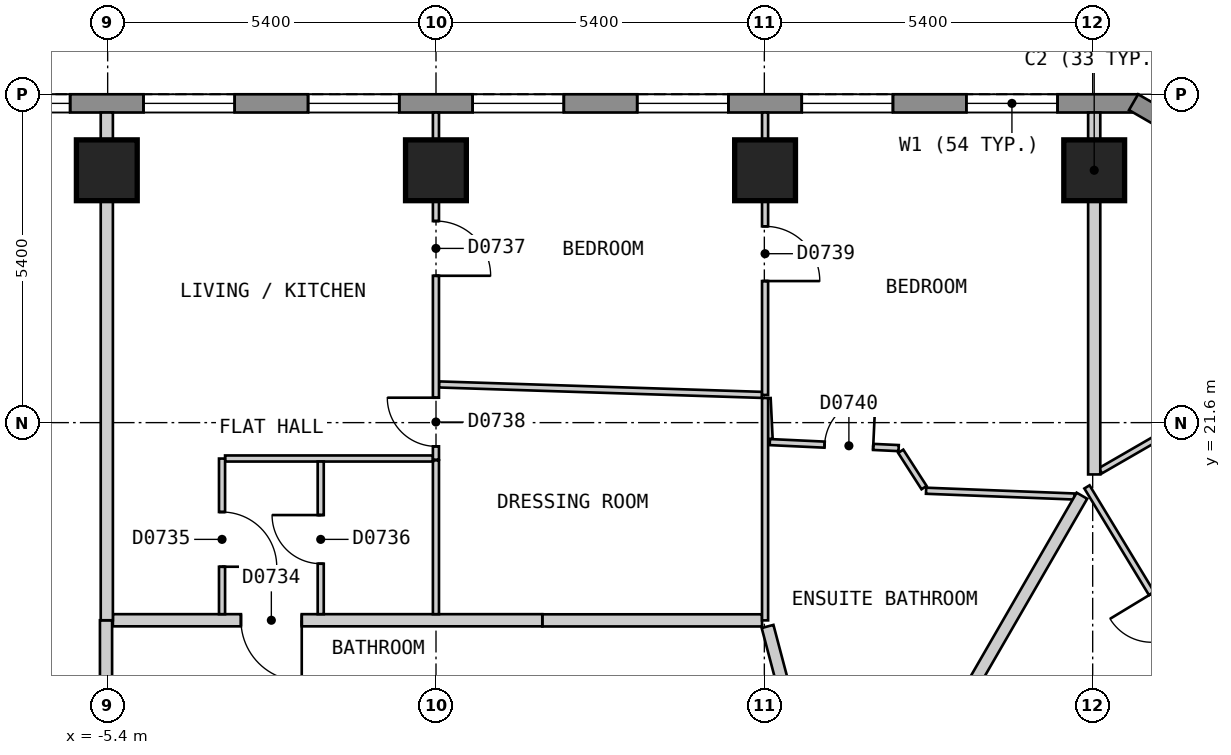
"""IFC4 building model, lengths in metres.
Left out: names, types, materials, properties, quantities, classifications, styles, units other than length and angle.
Written with IfcOpenShell. Run it as: python <this file> out.ifc"""

import sys

from ifc_helpers import new_model, si_unit, direction, frame, frame_2d, origin, origin_2d, place, context, subcontext, project, spatial, polyline, rectangle, outline, extrude, element, fill, save


model = new_model("IFC4")
c1 = context("Model", 3, precision=1e-05, world=origin(), true_north=direction((0.0, 1.0)))
c2 = subcontext(c1, "Body", "Model", "MODEL_VIEW")
j1 = project(units=[si_unit("LENGTHUNIT", "METRE"), si_unit("PLANEANGLEUNIT", "RADIAN")], contexts=[c1])
p1 = place(None, origin())
s1 = spatial("IfcSite", under=j1, at=p1, CompositionType="ELEMENT")
p2 = place(p1, origin())
s2 = spatial("IfcBuilding", under=s1, at=p2, CompositionType="ELEMENT")
p3 = place(p2, frame((0.0, 0.0, 105.0)))
s3 = spatial("IfcBuildingStorey", under=s2, at=p3, CompositionType="ELEMENT", Elevation=105.0)
for number, where, z_axis, x_axis in (
    (1, (10.825, 25.75, 0.0), (0.0, 0.0, 1.0), (-1.0, 0.0, 0.0)),
    (2, (5.412, 25.75, 0.0), (0.0, 0.0, 1.0), (-1.0, 0.0, 0.0)),
    (3, (-0.001, 25.75, 0.0), (0.0, 0.0, 1.0), (-1.0, 0.0, 0.0)),
    (4, (-5.414, 25.75, 0.0), (0.0, 0.0, 1.0), (-1.0, 0.0, 0.0)),
):
    element("IfcColumn", number, at=place(p3, frame(where, z_axis=z_axis, x_axis=x_axis)), inside=s3, PredefinedType="COLUMN", context=c2, shape_type="SweptSolid", body=[
        extrude(rectangle(XDim=1.0, YDim=1.0, at=origin_2d()), origin(), (0.0, 0.0, 1.0), 3.0),
    ])
p4 = place(p3, frame((11.547, 26.85, 0.0), z_axis=(0.0, 0.0, 1.0), x_axis=(-1.0, 0.0, 0.0)))
e5 = element("IfcWall", 5, at=p4, inside=s3, PredefinedType="SOLIDWALL", context=c2, shape_type="SweptSolid", body=[
    extrude(outline(polyline([(0.0, -0.15), (23.094, -0.15), (23.014, 0.15), (0.08, 0.15), (0.0, -0.15)])), origin(), (0.0, 0.0, 1.0), 2.6),
])
p5 = place(p4, frame((1.325, 0.0, 0.15)))
e6 = element("IfcOpeningElement", 6, at=p5, cuts=e5, PredefinedType="OPENING", context=c2, shape_type="SweptSolid", body=[
    extrude(rectangle(XDim=1.5, YDim=2.1, at=frame_2d((0.75, 1.05))), frame((0.0, 0.16, 0.0), z_axis=(0.0, -1.0, 0.0), x_axis=(1.0, 0.0, 0.0)), (0.0, 0.0, 1.0), 0.32),
])
p6 = place(p4, frame((4.032, 0.0, 0.15)))
e7 = element("IfcOpeningElement", 7, at=p6, cuts=e5, PredefinedType="OPENING", context=c2, shape_type="SweptSolid", body=[
    extrude(rectangle(XDim=1.5, YDim=2.1, at=frame_2d((0.75, 1.05))), frame((0.0, 0.16, 0.0), z_axis=(0.0, -1.0, 0.0), x_axis=(1.0, 0.0, 0.0)), (0.0, 0.0, 1.0), 0.32),
])
p7 = place(p4, frame((6.738, 0.0, 0.15)))
e8 = element("IfcOpeningElement", 8, at=p7, cuts=e5, PredefinedType="OPENING", context=c2, shape_type="SweptSolid", body=[
    extrude(rectangle(XDim=1.5, YDim=2.1, at=frame_2d((0.75, 1.05))), frame((0.0, 0.16, 0.0), z_axis=(0.0, -1.0, 0.0), x_axis=(1.0, 0.0, 0.0)), (0.0, 0.0, 1.0), 0.32),
])
p8 = place(p4, frame((9.445, 0.0, 0.15)))
e9 = element("IfcOpeningElement", 9, at=p8, cuts=e5, PredefinedType="OPENING", context=c2, shape_type="SweptSolid", body=[
    extrude(rectangle(XDim=1.5, YDim=2.1, at=frame_2d((0.75, 1.05))), frame((0.0, 0.16, 0.0), z_axis=(0.0, -1.0, 0.0), x_axis=(1.0, 0.0, 0.0)), (0.0, 0.0, 1.0), 0.32),
])
p9 = place(p4, frame((12.151, 0.0, 0.15)))
e10 = element("IfcOpeningElement", 10, at=p9, cuts=e5, PredefinedType="OPENING", context=c2, shape_type="SweptSolid", body=[
    extrude(rectangle(XDim=1.5, YDim=2.1, at=frame_2d((0.75, 1.05))), frame((0.0, 0.16, 0.0), z_axis=(0.0, -1.0, 0.0), x_axis=(1.0, 0.0, 0.0)), (0.0, 0.0, 1.0), 0.32),
])
p10 = place(p4, frame((14.858, 0.0, 0.15)))
e11 = element("IfcOpeningElement", 11, at=p10, cuts=e5, PredefinedType="OPENING", context=c2, shape_type="SweptSolid", body=[
    extrude(rectangle(XDim=1.5, YDim=2.1, at=frame_2d((0.75, 1.05))), frame((0.0, 0.16, 0.0), z_axis=(0.0, -1.0, 0.0), x_axis=(1.0, 0.0, 0.0)), (0.0, 0.0, 1.0), 0.32),
])
p11 = place(p4, frame((17.564, 0.0, 0.15)))
e12 = element("IfcOpeningElement", 12, at=p11, cuts=e5, PredefinedType="OPENING", context=c2, shape_type="SweptSolid", body=[
    extrude(rectangle(XDim=1.5, YDim=2.1, at=frame_2d((0.75, 1.05))), frame((0.0, 0.16, 0.0), z_axis=(0.0, -1.0, 0.0), x_axis=(1.0, 0.0, 0.0)), (0.0, 0.0, 1.0), 0.32),
])
p12 = place(p4, frame((20.271, 0.0, 0.15)))
e13 = element("IfcOpeningElement", 13, at=p12, cuts=e5, PredefinedType="OPENING", context=c2, shape_type="SweptSolid", body=[
    extrude(rectangle(XDim=1.5, YDim=2.1, at=frame_2d((0.75, 1.05))), frame((0.0, 0.16, 0.0), z_axis=(0.0, -1.0, 0.0), x_axis=(1.0, 0.0, 0.0)), (0.0, 0.0, 1.0), 0.32),
])
p13 = place(p3, frame((15.802, 24.37, 0.0), z_axis=(0.0, 0.0, 1.0), x_axis=(-0.866022959057, 0.500004234368, 0.0)))
e14 = element("IfcWall", 14, at=p13, inside=s3, PredefinedType="SOLIDWALL", context=c2, shape_type="SweptSolid", body=[
    extrude(outline(polyline([(0.0, -0.15), (5.0, -0.15), (4.92, 0.15), (0.08, 0.15), (0.0, -0.15)])), origin(), (0.0, 0.0, 1.0), 2.6),
])
p14 = place(p13, frame((0.65, 0.0, 0.15)))
e15 = element("IfcOpeningElement", 15, at=p14, cuts=e14, PredefinedType="OPENING", context=c2, shape_type="SweptSolid", body=[
    extrude(rectangle(XDim=1.2, YDim=2.1, at=frame_2d((0.6, 1.05))), frame((0.0, 0.16, 0.0), z_axis=(0.0, -1.0, 0.0), x_axis=(1.0, 0.0, 0.0)), (0.0, 0.0, 1.0), 0.32),
])
p15 = place(p13, frame((3.15, 0.0, 0.15)))
e16 = element("IfcOpeningElement", 16, at=p15, cuts=e14, PredefinedType="OPENING", context=c2, shape_type="SweptSolid", body=[
    extrude(rectangle(XDim=1.2, YDim=2.1, at=frame_2d((0.6, 1.05))), frame((0.0, 0.16, 0.0), z_axis=(0.0, -1.0, 0.0), x_axis=(1.0, 0.0, 0.0)), (0.0, 0.0, 1.0), 0.32),
])
p16 = place(p3, frame((5.453, 18.248, 0.0), z_axis=(0.0, 0.0, 1.0), x_axis=(0.255687088482, -0.9667595941, 0.0)))
e17 = element("IfcWall", 17, at=p16, inside=s3, PredefinedType="PARTITIONING", context=c2, shape_type="SweptSolid", body=[
    extrude(rectangle(XDim=1.6, YDim=0.2, at=frame_2d((0.8, 0.0))), origin(), (0.0, 0.0, 1.0), 2.6),
])
p17 = place(p3, frame((1.75, 18.348, 0.0), z_axis=(0.0, 0.0, 1.0), x_axis=(1.0, 0.0, 0.0)))
e18 = element("IfcWall", 18, at=p17, inside=s3, PredefinedType="PARTITIONING", context=c2, shape_type="SweptSolid", body=[
    extrude(rectangle(XDim=3.612, YDim=0.2, at=frame_2d((1.806, 0.0))), origin(), (0.0, 0.0, 1.0), 2.6),
])
p18 = place(p3, frame((-5.314, 18.35, 0.0), z_axis=(0.0, 0.0, 1.0), x_axis=(1.0, 0.0, 0.0)))
e19 = element("IfcWall", 19, at=p18, inside=s3, PredefinedType="PARTITIONING", context=c2, shape_type="SweptSolid", body=[
    extrude(rectangle(XDim=7.062, YDim=0.2, at=frame_2d((3.531, 0.0))), origin(), (0.0, 0.0, 1.0), 2.6),
])
p19 = place(p18, frame((2.106, 0.0, 0.0)))
e20 = element("IfcOpeningElement", 20, at=p19, cuts=e19, PredefinedType="OPENING", context=c2, shape_type="SweptSolid", body=[
    extrude(rectangle(XDim=1.0, YDim=2.1, at=frame_2d((0.5, 1.05))), frame((0.0, 0.11, 0.0), z_axis=(0.0, -1.0, 0.0), x_axis=(1.0, 0.0, 0.0)), (0.0, 0.0, 1.0), 0.22),
])
p20 = place(p3, frame((-5.427, 17.4, 0.0), z_axis=(0.0, 0.0, 1.0), x_axis=(0.0, 1.0, 0.0)))
e21 = element("IfcWall", 21, at=p20, inside=s3, PredefinedType="PARTITIONING", context=c2, shape_type="SweptSolid", body=[
    extrude(rectangle(XDim=0.95, YDim=0.2, at=frame_2d((0.475, 0.0))), origin(), (0.0, 0.0, 1.0), 2.6),
])
p21 = place(p3, frame((7.643, 21.129, 0.0), z_axis=(0.0, 0.0, 1.0), x_axis=(0.540427628168, -0.841390503104, 0.0)))
e22 = element("IfcWall", 22, at=p21, inside=s3, PredefinedType="PARTITIONING", context=c2, shape_type="SweptSolid", body=[
    extrude(rectangle(XDim=0.711, YDim=0.1, at=frame_2d((0.355, 0.0))), origin(), (0.0, 0.0, 1.0), 2.6),
])
p22 = place(p3, frame((10.706, 20.543, 0.0), z_axis=(0.0, 0.0, 1.0), x_axis=(0.518240414093, -0.855234981278, 0.0)))
e23 = element("IfcWall", 23, at=p22, inside=s3, PredefinedType="PARTITIONING", context=c2, shape_type="SweptSolid", body=[
    extrude(rectangle(XDim=4.855, YDim=0.1, at=frame_2d((2.427, 0.0))), origin(), (0.0, 0.0, 1.0), 2.6),
])
p23 = place(p22, frame((2.052, 0.0, 0.0)))
e24 = element("IfcOpeningElement", 24, at=p23, cuts=e23, PredefinedType="OPENING", context=c2, shape_type="SweptSolid", body=[
    extrude(rectangle(XDim=0.8, YDim=2.1, at=frame_2d((0.4, 1.05))), frame((0.0, 0.06, 0.0), z_axis=(0.0, -1.0, 0.0), x_axis=(1.0, 0.0, 0.0)), (0.0, 0.0, 1.0), 0.12),
])
p24 = place(p3, frame((5.454, 22.002, 0.0), z_axis=(0.0, 0.0, 1.0), x_axis=(0.048996315227, -0.998798959298, 0.0)))
e25 = element("IfcWall", 25, at=p24, inside=s3, PredefinedType="PARTITIONING", context=c2, shape_type="SweptSolid", body=[
    extrude(rectangle(XDim=0.673, YDim=0.1, at=frame_2d((0.336, 0.0))), origin(), (0.0, 0.0, 1.0), 2.6),
])
p25 = place(p3, frame((-0.001, 20.98, 0.0), z_axis=(0.0, 0.0, 1.0), x_axis=(0.0, -1.0, 0.0)))
e26 = element("IfcWall", 26, at=p25, inside=s3, PredefinedType="PARTITIONING", context=c2, shape_type="SweptSolid", body=[
    extrude(rectangle(XDim=2.53, YDim=0.1, at=frame_2d((1.265, 0.0))), origin(), (0.0, 0.0, 1.0), 2.6),
])
p26 = place(p3, frame((5.412, 22.005, 0.0), z_axis=(0.0, 0.0, 1.0), x_axis=(0.0, -1.0, 0.0)))
e27 = element("IfcWall", 27, at=p26, inside=s3, PredefinedType="PARTITIONING", context=c2, shape_type="SweptSolid", body=[
    extrude(rectangle(XDim=3.657, YDim=0.1, at=frame_2d((1.829, 0.0))), origin(), (0.0, 0.0, 1.0), 2.6),
])
p27 = place(p3, frame((8.06, 20.48, 0.0), z_axis=(0.0, 0.0, 1.0), x_axis=(0.999243345912, -0.038893902497, 0.0)))
e28 = element("IfcWall", 28, at=p27, inside=s3, PredefinedType="PARTITIONING", context=c2, shape_type="SweptSolid", body=[
    extrude(rectangle(XDim=2.442, YDim=0.1, at=frame_2d((1.221, 0.0))), origin(), (0.0, 0.0, 1.0), 2.6),
])
p28 = place(p3, frame((0.049, 22.228, 0.0), z_axis=(0.0, 0.0, 1.0), x_axis=(0.99947566488, -0.032378933174, 0.0)))
e29 = element("IfcWall", 29, at=p28, inside=s3, PredefinedType="PARTITIONING", context=c2, shape_type="SweptSolid", body=[
    extrude(rectangle(XDim=5.316, YDim=0.1, at=frame_2d((2.658, 0.0))), origin(), (0.0, 0.0, 1.0), 2.6),
])
p29 = place(p3, frame((5.49, 21.28, 0.0), z_axis=(0.0, 0.0, 1.0), x_axis=(0.998907627838, -0.046728482187, 0.0)))
e30 = element("IfcWall", 30, at=p29, inside=s3, PredefinedType="PARTITIONING", context=c2, shape_type="SweptSolid", body=[
    extrude(rectangle(XDim=2.121, YDim=0.1, at=frame_2d((1.061, 0.0))), origin(), (0.0, 0.0, 1.0), 2.6),
])
p30 = place(p29, frame((0.902, 0.0, 0.0)))
e31 = element("IfcOpeningElement", 31, at=p30, cuts=e30, PredefinedType="OPENING", context=c2, shape_type="SweptSolid", body=[
    extrude(rectangle(XDim=0.8, YDim=2.1, at=frame_2d((0.4, 1.05))), frame((0.0, 0.06, 0.0), z_axis=(0.0, -1.0, 0.0), x_axis=(1.0, 0.0, 0.0)), (0.0, 0.0, 1.0), 0.12),
])
p31 = place(p3, frame((-3.469, 21.01, 0.0), z_axis=(0.0, 0.0, 1.0), x_axis=(1.0, 0.0, 0.0)))
e32 = element("IfcWall", 32, at=p31, inside=s3, PredefinedType="PARTITIONING", context=c2, shape_type="SweptSolid", body=[
    extrude(rectangle(XDim=3.418, YDim=0.1, at=frame_2d((1.709, 0.0))), origin(), (0.0, 0.0, 1.0), 2.6),
])
p32 = place(p3, frame((5.412, 22.055, 0.0), z_axis=(0.0, 0.0, 1.0), x_axis=(0.0, 1.0, 0.0)))
e33 = element("IfcWall", 33, at=p32, inside=s3, PredefinedType="PARTITIONING", context=c2, shape_type="SweptSolid", body=[
    extrude(rectangle(XDim=4.645, YDim=0.1, at=frame_2d((2.323, 0.0))), origin(), (0.0, 0.0, 1.0), 2.6),
])
p33 = place(p32, frame((1.873, 0.0, 0.0)))
e34 = element("IfcOpeningElement", 34, at=p33, cuts=e33, PredefinedType="OPENING", context=c2, shape_type="SweptSolid", body=[
    extrude(rectangle(XDim=0.9, YDim=2.1, at=frame_2d((0.45, 1.05))), frame((0.0, 0.06, 0.0), z_axis=(0.0, -1.0, 0.0), x_axis=(1.0, 0.0, 0.0)), (0.0, 0.0, 1.0), 0.12),
])
p34 = place(p3, frame((-0.001, 20.99, 0.0), z_axis=(0.0, 0.0, 1.0), x_axis=(0.0, 1.0, 0.0)))
e35 = element("IfcWall", 35, at=p34, inside=s3, PredefinedType="PARTITIONING", context=c2, shape_type="SweptSolid", body=[
    extrude(rectangle(XDim=5.71, YDim=0.1, at=frame_2d((2.855, 0.0))), origin(), (0.0, 0.0, 1.0), 2.6),
])
p35 = place(p34, frame((3.025, 0.0, 0.0)))
e36 = element("IfcOpeningElement", 36, at=p35, cuts=e35, PredefinedType="OPENING", context=c2, shape_type="SweptSolid", body=[
    extrude(rectangle(XDim=0.9, YDim=2.1, at=frame_2d((0.45, 1.05))), frame((0.0, 0.06, 0.0), z_axis=(0.0, -1.0, 0.0), x_axis=(1.0, 0.0, 0.0)), (0.0, 0.0, 1.0), 0.12),
])
p36 = place(p34, frame((0.22, 0.0, 0.0)))
e37 = element("IfcOpeningElement", 37, at=p36, cuts=e35, PredefinedType="OPENING", context=c2, shape_type="SweptSolid", body=[
    extrude(rectangle(XDim=0.8, YDim=2.1, at=frame_2d((0.4, 1.05))), frame((0.0, 0.06, 0.0), z_axis=(0.0, -1.0, 0.0), x_axis=(1.0, 0.0, 0.0)), (0.0, 0.0, 1.0), 0.12),
])
p37 = place(p3, frame((-3.519, 18.45, 0.0), z_axis=(0.0, 0.0, 1.0), x_axis=(0.0, 1.0, 0.0)))
e38 = element("IfcWall", 38, at=p37, inside=s3, PredefinedType="PARTITIONING", context=c2, shape_type="SweptSolid", body=[
    extrude(rectangle(XDim=2.559, YDim=0.1, at=frame_2d((1.28, 0.0))), origin(), (0.0, 0.0, 1.0), 2.6),
])
p38 = place(p37, frame((0.78, 0.0, 0.0)))
e39 = element("IfcOpeningElement", 39, at=p38, cuts=e38, PredefinedType="OPENING", context=c2, shape_type="SweptSolid", body=[
    extrude(rectangle(XDim=0.9, YDim=2.1, at=frame_2d((0.45, 1.05))), frame((0.0, 0.06, 0.0), z_axis=(0.0, -1.0, 0.0), x_axis=(1.0, 0.0, 0.0)), (0.0, 0.0, 1.0), 0.12),
])
p39 = place(p3, frame((-1.896, 18.45, 0.0), z_axis=(0.0, 0.0, 1.0), x_axis=(0.0, 1.0, 0.0)))
e40 = element("IfcWall", 40, at=p39, inside=s3, PredefinedType="PARTITIONING", context=c2, shape_type="SweptSolid", body=[
    extrude(rectangle(XDim=2.51, YDim=0.1, at=frame_2d((1.255, 0.0))), origin(), (0.0, 0.0, 1.0), 2.6),
])
p40 = place(p39, frame((0.83, 0.0, 0.0)))
e41 = element("IfcOpeningElement", 41, at=p40, cuts=e40, PredefinedType="OPENING", context=c2, shape_type="SweptSolid", body=[
    extrude(rectangle(XDim=0.8, YDim=2.1, at=frame_2d((0.4, 1.05))), frame((0.0, 0.06, 0.0), z_axis=(0.0, -1.0, 0.0), x_axis=(1.0, 0.0, 0.0)), (0.0, 0.0, 1.0), 0.12),
])
p41 = place(p3, frame((9.83, 14.375, 0.0), z_axis=(0.0, 0.0, 1.0), x_axis=(0.866016855193, 0.500014806302, 0.0)))
e42 = element("IfcWall", 42, at=p41, inside=s3, PredefinedType="PARTITIONING", context=c2, shape_type="SweptSolid", body=[
    extrude(rectangle(XDim=10.0, YDim=0.1, at=frame_2d((5.0, 0.0))), origin(), (0.0, 0.0, 1.0), 2.6),
])
p42 = place(p41, frame((6.523, 0.0, 0.0)))
e43 = element("IfcOpeningElement", 43, at=p42, cuts=e42, PredefinedType="OPENING", context=c2, shape_type="SweptSolid", body=[
    extrude(rectangle(XDim=0.9, YDim=2.1, at=frame_2d((0.45, 1.05))), frame((0.0, 0.06, 0.0), z_axis=(0.0, -1.0, 0.0), x_axis=(1.0, 0.0, 0.0)), (0.0, 0.0, 1.0), 0.12),
])
p43 = place(p3, frame((10.926, 20.808, 0.0), z_axis=(0.0, 0.0, 1.0), x_axis=(0.86600925905, 0.500027962457, 0.0)))
e44 = element("IfcWall", 44, at=p43, inside=s3, PredefinedType="PARTITIONING", context=c2, shape_type="SweptSolid", body=[
    extrude(rectangle(XDim=5.834, YDim=0.1, at=frame_2d((2.917, 0.0))), origin(), (0.0, 0.0, 1.0), 2.6),
])
p44 = place(p43, frame((2.409, 0.0, 0.0)))
e45 = element("IfcOpeningElement", 45, at=p44, cuts=e44, PredefinedType="OPENING", context=c2, shape_type="SweptSolid", body=[
    extrude(rectangle(XDim=0.9, YDim=2.1, at=frame_2d((0.45, 1.05))), frame((0.0, 0.06, 0.0), z_axis=(0.0, -1.0, 0.0), x_axis=(1.0, 0.0, 0.0)), (0.0, 0.0, 1.0), 0.12),
])
p45 = place(p3, frame((-5.414, 26.7, 0.0), z_axis=(0.0, 0.0, 1.0), x_axis=(0.0, -1.0, 0.0)))
e46 = element("IfcWall", 46, at=p45, inside=s3, PredefinedType="PARTITIONING", context=c2, shape_type="SweptSolid", body=[
    extrude(rectangle(XDim=8.35, YDim=0.2, at=frame_2d((4.175, 0.0))), origin(), (0.0, 0.0, 1.0), 2.6),
])
p46 = place(p3, frame((8.43, 16.6, 0.0), z_axis=(0.0, 0.0, 1.0), x_axis=(0.500072613115, 0.865983476524, 0.0)))
e47 = element("IfcWall", 47, at=p46, inside=s3, PredefinedType="PARTITIONING", context=c2, shape_type="SweptSolid", body=[
    extrude(rectangle(XDim=4.385, YDim=0.2, at=frame_2d((2.193, 0.0))), origin(), (0.0, 0.0, 1.0), 2.6),
])
p47 = place(p3, frame((10.825, 20.748, 0.0), z_axis=(0.0, 0.0, 1.0), x_axis=(0.0, 1.0, 0.0)))
e48 = element("IfcWall", 48, at=p47, inside=s3, PredefinedType="PARTITIONING", context=c2, shape_type="SweptSolid", body=[
    extrude(rectangle(XDim=5.952, YDim=0.2, at=frame_2d((2.976, 0.0))), origin(), (0.0, 0.0, 1.0), 2.6),
])
p48 = place(p5, origin())
e49 = element("IfcWindow", 49, at=p48, inside=s3, PartitioningType="SINGLE_PANEL", PredefinedType="WINDOW", context=c2, shape_type="SweptSolid", body=[
    extrude(rectangle(XDim=1.5, YDim=2.1, at=frame_2d((0.75, 1.05))), frame((0.0, 0.03, 0.0), z_axis=(0.0, -1.0, 0.0), x_axis=(1.0, 0.0, 0.0)), (0.0, 0.0, 1.0), 0.06),
])
fill(e6, e49)
p49 = place(p6, origin())
e50 = element("IfcWindow", 50, at=p49, inside=s3, PartitioningType="SINGLE_PANEL", PredefinedType="WINDOW", context=c2, shape_type="SweptSolid", body=[
    extrude(rectangle(XDim=1.5, YDim=2.1, at=frame_2d((0.75, 1.05))), frame((0.0, 0.03, 0.0), z_axis=(0.0, -1.0, 0.0), x_axis=(1.0, 0.0, 0.0)), (0.0, 0.0, 1.0), 0.06),
])
fill(e7, e50)
p50 = place(p7, origin())
e51 = element("IfcWindow", 51, at=p50, inside=s3, PartitioningType="SINGLE_PANEL", PredefinedType="WINDOW", context=c2, shape_type="SweptSolid", body=[
    extrude(rectangle(XDim=1.5, YDim=2.1, at=frame_2d((0.75, 1.05))), frame((0.0, 0.03, 0.0), z_axis=(0.0, -1.0, 0.0), x_axis=(1.0, 0.0, 0.0)), (0.0, 0.0, 1.0), 0.06),
])
fill(e8, e51)
p51 = place(p8, origin())
e52 = element("IfcWindow", 52, at=p51, inside=s3, PartitioningType="SINGLE_PANEL", PredefinedType="WINDOW", context=c2, shape_type="SweptSolid", body=[
    extrude(rectangle(XDim=1.5, YDim=2.1, at=frame_2d((0.75, 1.05))), frame((0.0, 0.03, 0.0), z_axis=(0.0, -1.0, 0.0), x_axis=(1.0, 0.0, 0.0)), (0.0, 0.0, 1.0), 0.06),
])
fill(e9, e52)
p52 = place(p9, origin())
e53 = element("IfcWindow", 53, at=p52, inside=s3, PartitioningType="SINGLE_PANEL", PredefinedType="WINDOW", context=c2, shape_type="SweptSolid", body=[
    extrude(rectangle(XDim=1.5, YDim=2.1, at=frame_2d((0.75, 1.05))), frame((0.0, 0.03, 0.0), z_axis=(0.0, -1.0, 0.0), x_axis=(1.0, 0.0, 0.0)), (0.0, 0.0, 1.0), 0.06),
])
fill(e10, e53)
p53 = place(p10, origin())
e54 = element("IfcWindow", 54, at=p53, inside=s3, PartitioningType="SINGLE_PANEL", PredefinedType="WINDOW", context=c2, shape_type="SweptSolid", body=[
    extrude(rectangle(XDim=1.5, YDim=2.1, at=frame_2d((0.75, 1.05))), frame((0.0, 0.03, 0.0), z_axis=(0.0, -1.0, 0.0), x_axis=(1.0, 0.0, 0.0)), (0.0, 0.0, 1.0), 0.06),
])
fill(e11, e54)
p54 = place(p11, origin())
e55 = element("IfcWindow", 55, at=p54, inside=s3, PartitioningType="SINGLE_PANEL", PredefinedType="WINDOW", context=c2, shape_type="SweptSolid", body=[
    extrude(rectangle(XDim=1.5, YDim=2.1, at=frame_2d((0.75, 1.05))), frame((0.0, 0.03, 0.0), z_axis=(0.0, -1.0, 0.0), x_axis=(1.0, 0.0, 0.0)), (0.0, 0.0, 1.0), 0.06),
])
fill(e12, e55)
p55 = place(p23, origin())
e56 = element("IfcDoor", 56, at=p55, inside=s3, OperationType="SINGLE_SWING_LEFT", PredefinedType="DOOR", context=c2, shape_type="SweptSolid", body=[
    extrude(rectangle(XDim=0.8, YDim=2.1, at=frame_2d((0.4, 1.05))), frame((0.0, 0.025, 0.0), z_axis=(0.0, -1.0, 0.0), x_axis=(1.0, 0.0, 0.0)), (0.0, 0.0, 1.0), 0.05),
])
fill(e24, e56)
p56 = place(p19, origin())
e57 = element("IfcDoor", 57, at=p56, inside=s3, OperationType="SINGLE_SWING_RIGHT", PredefinedType="DOOR", context=c2, shape_type="SweptSolid", body=[
    extrude(rectangle(XDim=1.0, YDim=2.1, at=frame_2d((0.5, 1.05))), frame((0.0, 0.025, 0.0), z_axis=(0.0, -1.0, 0.0), x_axis=(1.0, 0.0, 0.0)), (0.0, 0.0, 1.0), 0.05),
])
fill(e20, e57)
p57 = place(p38, origin())
e58 = element("IfcDoor", 58, at=p57, inside=s3, OperationType="SINGLE_SWING_LEFT", PredefinedType="DOOR", context=c2, shape_type="SweptSolid", body=[
    extrude(rectangle(XDim=0.9, YDim=2.1, at=frame_2d((0.45, 1.05))), frame((0.0, 0.025, 0.0), z_axis=(0.0, -1.0, 0.0), x_axis=(1.0, 0.0, 0.0)), (0.0, 0.0, 1.0), 0.05),
])
fill(e39, e58)
p58 = place(p40, origin())
e59 = element("IfcDoor", 59, at=p58, inside=s3, OperationType="SINGLE_SWING_RIGHT", PredefinedType="DOOR", context=c2, shape_type="SweptSolid", body=[
    extrude(rectangle(XDim=0.8, YDim=2.1, at=frame_2d((0.4, 1.05))), frame((0.0, 0.025, 0.0), z_axis=(0.0, -1.0, 0.0), x_axis=(1.0, 0.0, 0.0)), (0.0, 0.0, 1.0), 0.05),
])
fill(e41, e59)
p59 = place(p35, origin())
e60 = element("IfcDoor", 60, at=p59, inside=s3, OperationType="SINGLE_SWING_LEFT", PredefinedType="DOOR", context=c2, shape_type="SweptSolid", body=[
    extrude(rectangle(XDim=0.9, YDim=2.1, at=frame_2d((0.45, 1.05))), frame((0.0, 0.025, 0.0), z_axis=(0.0, -1.0, 0.0), x_axis=(1.0, 0.0, 0.0)), (0.0, 0.0, 1.0), 0.05),
])
fill(e36, e60)
p60 = place(p36, origin())
e61 = element("IfcDoor", 61, at=p60, inside=s3, OperationType="SINGLE_SWING_RIGHT", PredefinedType="DOOR", context=c2, shape_type="SweptSolid", body=[
    extrude(rectangle(XDim=0.8, YDim=2.1, at=frame_2d((0.4, 1.05))), frame((0.0, 0.025, 0.0), z_axis=(0.0, -1.0, 0.0), x_axis=(1.0, 0.0, 0.0)), (0.0, 0.0, 1.0), 0.05),
])
fill(e37, e61)
p61 = place(p33, origin())
e62 = element("IfcDoor", 62, at=p61, inside=s3, OperationType="SINGLE_SWING_LEFT", PredefinedType="DOOR", context=c2, shape_type="SweptSolid", body=[
    extrude(rectangle(XDim=0.9, YDim=2.1, at=frame_2d((0.45, 1.05))), frame((0.0, 0.025, 0.0), z_axis=(0.0, -1.0, 0.0), x_axis=(1.0, 0.0, 0.0)), (0.0, 0.0, 1.0), 0.05),
])
fill(e34, e62)
p62 = place(p30, origin())
e63 = element("IfcDoor", 63, at=p62, inside=s3, OperationType="SINGLE_SWING_RIGHT", PredefinedType="DOOR", context=c2, shape_type="SweptSolid", body=[
    extrude(rectangle(XDim=0.8, YDim=2.1, at=frame_2d((0.4, 1.05))), frame((0.0, 0.025, 0.0), z_axis=(0.0, -1.0, 0.0), x_axis=(1.0, 0.0, 0.0)), (0.0, 0.0, 1.0), 0.05),
])
fill(e31, e63)
save(model, sys.argv[1])
